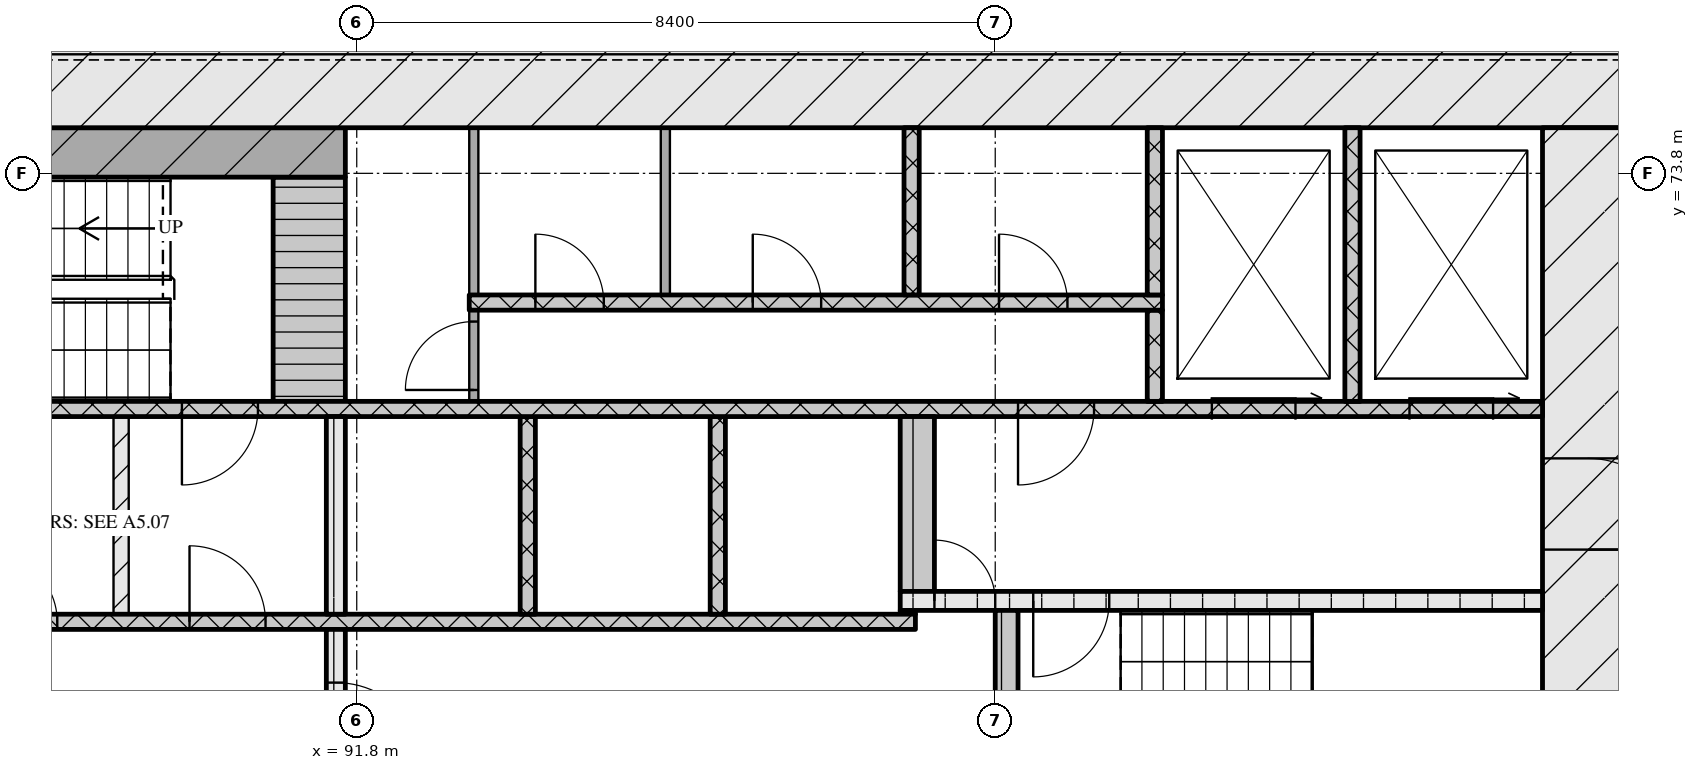
"""IFC4 building model, lengths in metres.
Left out: names, types, materials, properties, quantities, classifications, styles, units other than length and angle.
Written with IfcOpenShell. Run it as: python <this file> out.ifc"""

import sys

from ifc_helpers import new_model, si_unit, direction, frame, frame_2d, origin, place, context, subcontext, project, spatial, rectangle, extrude, element, fill, save


model = new_model("IFC4")
c1 = context("Model", 3, precision=1e-05, world=origin(), true_north=direction((0.0, 1.0)))
c2 = subcontext(c1, "Body", "Model", "MODEL_VIEW")
j1 = project(units=[si_unit("LENGTHUNIT", "METRE"), si_unit("PLANEANGLEUNIT", "RADIAN")], contexts=[c1])
p1 = place(None, origin())
s1 = spatial("IfcSite", under=j1, at=p1, CompositionType="ELEMENT")
p2 = place(p1, origin())
s2 = spatial("IfcBuilding", under=s1, at=p2, CompositionType="ELEMENT")
p3 = place(p2, frame((0.0, 0.0, 37.2)))
s3 = spatial("IfcBuildingStorey", under=s2, at=p3, CompositionType="ELEMENT", Elevation=37.2)
p4 = place(p3, frame((66.6, 75.0, 0.0), z_axis=(0.0, 0.0, 1.0), x_axis=(1.0, 0.0, 0.0)))
e1 = element("IfcWall", 1, at=p4, inside=s3, PredefinedType="SOLIDWALL", context=c2, shape_type="SweptSolid", body=[
    extrude(rectangle(XDim=42.0, YDim=1.2, at=frame_2d((21.0, 0.0))), origin(), (0.0, 0.0, 1.0), 3.32),
])
p5 = place(p3, frame((108.0, 62.4, 0.0), z_axis=(0.0, 0.0, 1.0), x_axis=(0.0, 1.0, 0.0)))
e2 = element("IfcWall", 2, at=p5, inside=s3, PredefinedType="SOLIDWALL", context=c2, shape_type="SweptSolid", body=[
    extrude(rectangle(XDim=12.0, YDim=1.2, at=frame_2d((6.0, 0.0))), origin(), (0.0, 0.0, 1.0), 3.32),
])
p6 = place(p5, frame((6.45, 0.0, 0.0)))
e3 = element("IfcOpeningElement", 3, at=p6, cuts=e2, PredefinedType="OPENING", context=c2, shape_type="SweptSolid", body=[
    extrude(rectangle(XDim=1.2, YDim=2.1, at=frame_2d((0.6, 1.05))), frame((0.0, 0.61, 0.0), z_axis=(0.0, -1.0, 0.0), x_axis=(1.0, 0.0, 0.0)), (0.0, 0.0, 1.0), 1.22),
])
p7 = place(p3, frame((91.525, 65.2, 0.0), z_axis=(0.0, 0.0, 1.0), x_axis=(0.0, 1.0, 0.0)))
e4 = element("IfcWall", 4, at=p7, inside=s3, PredefinedType="SOLIDWALL", context=c2, shape_type="SweptSolid", body=[
    extrude(rectangle(XDim=2.6, YDim=0.25, at=frame_2d((1.3, 0.0))), origin(), (0.0, 0.0, 1.0), 3.32),
])
p8 = place(p7, frame((0.7, 0.0, 0.0)))
e5 = element("IfcOpeningElement", 5, at=p8, cuts=e4, PredefinedType="OPENING", context=c2, shape_type="SweptSolid", body=[
    extrude(rectangle(XDim=1.2, YDim=2.1, at=frame_2d((0.6, 1.05))), frame((0.0, 0.135, 0.0), z_axis=(0.0, -1.0, 0.0), x_axis=(1.0, 0.0, 0.0)), (0.0, 0.0, 1.0), 0.27),
])
p9 = place(p3, frame((100.35, 65.2, 0.0), z_axis=(0.0, 0.0, 1.0), x_axis=(0.0, 1.0, 0.0)))
e6 = element("IfcWall", 6, at=p9, inside=s3, PredefinedType="SOLIDWALL", context=c2, shape_type="SweptSolid", body=[
    extrude(rectangle(XDim=2.85, YDim=0.3, at=frame_2d((1.425, 0.0))), origin(), (0.0, 0.0, 1.0), 3.32),
])
p10 = place(p3, frame((76.05, 67.9, 0.0), z_axis=(0.0, 0.0, 1.0), x_axis=(1.0, 0.0, 0.0)))
e7 = element("IfcWall", 7, at=p10, inside=s3, PredefinedType="SOLIDWALL", context=c2, shape_type="SweptSolid", body=[
    extrude(rectangle(XDim=23.1, YDim=0.2, at=frame_2d((11.55, 0.0))), origin(), (0.0, 0.0, 1.0), 3.32),
])
p11 = place(p10, frame((0.6, 0.0, 0.0)))
e8 = element("IfcOpeningElement", 8, at=p11, cuts=e7, PredefinedType="OPENING", context=c2, shape_type="SweptSolid", body=[
    extrude(rectangle(XDim=1.1, YDim=2.1, at=frame_2d((0.55, 1.05))), frame((0.0, 0.11, 0.0), z_axis=(0.0, -1.0, 0.0), x_axis=(1.0, 0.0, 0.0)), (0.0, 0.0, 1.0), 0.22),
])
p12 = place(p10, frame((3.1, 0.0, 0.0)))
e9 = element("IfcOpeningElement", 9, at=p12, cuts=e7, PredefinedType="OPENING", context=c2, shape_type="SweptSolid", body=[
    extrude(rectangle(XDim=1.1, YDim=2.1, at=frame_2d((0.55, 1.05))), frame((0.0, 0.11, 0.0), z_axis=(0.0, -1.0, 0.0), x_axis=(1.0, 0.0, 0.0)), (0.0, 0.0, 1.0), 0.22),
])
p13 = place(p10, frame((5.6, 0.0, 0.0)))
e10 = element("IfcOpeningElement", 10, at=p13, cuts=e7, PredefinedType="OPENING", context=c2, shape_type="SweptSolid", body=[
    extrude(rectangle(XDim=1.1, YDim=2.1, at=frame_2d((0.55, 1.05))), frame((0.0, 0.11, 0.0), z_axis=(0.0, -1.0, 0.0), x_axis=(1.0, 0.0, 0.0)), (0.0, 0.0, 1.0), 0.22),
])
p14 = place(p10, frame((8.45, 0.0, 0.0)))
e11 = element("IfcOpeningElement", 11, at=p14, cuts=e7, PredefinedType="OPENING", context=c2, shape_type="SweptSolid", body=[
    extrude(rectangle(XDim=0.9, YDim=2.1, at=frame_2d((0.45, 1.05))), frame((0.0, 0.11, 0.0), z_axis=(0.0, -1.0, 0.0), x_axis=(1.0, 0.0, 0.0)), (0.0, 0.0, 1.0), 0.22),
])
p15 = place(p10, frame((10.91, 0.0, 0.0)))
e12 = element("IfcOpeningElement", 12, at=p15, cuts=e7, PredefinedType="OPENING", context=c2, shape_type="SweptSolid", body=[
    extrude(rectangle(XDim=0.9, YDim=2.1, at=frame_2d((0.45, 1.05))), frame((0.0, 0.11, 0.0), z_axis=(0.0, -1.0, 0.0), x_axis=(1.0, 0.0, 0.0)), (0.0, 0.0, 1.0), 0.22),
])
p16 = place(p10, frame((13.55, 0.0, 0.0)))
e13 = element("IfcOpeningElement", 13, at=p16, cuts=e7, PredefinedType="OPENING", context=c2, shape_type="SweptSolid", body=[
    extrude(rectangle(XDim=1.0, YDim=2.1, at=frame_2d((0.5, 1.05))), frame((0.0, 0.11, 0.0), z_axis=(0.0, -1.0, 0.0), x_axis=(1.0, 0.0, 0.0)), (0.0, 0.0, 1.0), 0.22),
])
p17 = place(p3, frame((88.7, 68.0, 0.0), z_axis=(0.0, 0.0, 1.0), x_axis=(0.0, 1.0, 0.0)))
e14 = element("IfcWall", 14, at=p17, inside=s3, PredefinedType="PARTITIONING", context=c2, shape_type="SweptSolid", body=[
    extrude(rectangle(XDim=2.6, YDim=0.2, at=frame_2d((1.3, 0.0))), origin(), (0.0, 0.0, 1.0), 3.32),
])
p18 = place(p3, frame((91.525, 68.0, 0.0), z_axis=(0.0, 0.0, 1.0), x_axis=(0.0, 1.0, 0.0)))
e15 = element("IfcWall", 15, at=p18, inside=s3, PredefinedType="SOLIDWALL", context=c2, shape_type="SweptSolid", body=[
    extrude(rectangle(XDim=2.6, YDim=0.25, at=frame_2d((1.3, 0.0))), origin(), (0.0, 0.0, 1.0), 3.32),
])
for number, where, z_axis, x_axis in (
    (16, (94.05, 68.0, 0.0), (0.0, 0.0, 1.0), (0.0, 1.0, 0.0)),
    (17, (96.55, 68.0, 0.0), (0.0, 0.0, 1.0), (0.0, 1.0, 0.0)),
):
    element("IfcWall", number, at=place(p3, frame(where, z_axis=z_axis, x_axis=x_axis)), inside=s3, PredefinedType="SOLIDWALL", context=c2, shape_type="SweptSolid", body=[
        extrude(rectangle(XDim=2.6, YDim=0.2, at=frame_2d((1.3, 0.0))), origin(), (0.0, 0.0, 1.0), 3.32),
    ])
p19 = place(p3, frame((98.95, 68.025, 0.0), z_axis=(0.0, 0.0, 1.0), x_axis=(1.0, 0.0, 0.0)))
e18 = element("IfcWall", 18, at=p19, inside=s3, PredefinedType="SOLIDWALL", context=c2, shape_type="SweptSolid", body=[
    extrude(rectangle(XDim=0.2, YDim=0.05, at=frame_2d((0.1, 0.0))), origin(), (0.0, 0.0, 1.0), 3.32),
])
p20 = place(p3, frame((98.95, 68.175, 0.0), z_axis=(0.0, 0.0, 1.0), x_axis=(1.0, 0.0, 0.0)))
e19 = element("IfcWall", 19, at=p20, inside=s3, PredefinedType="SOLIDWALL", context=c2, shape_type="SweptSolid", body=[
    extrude(rectangle(XDim=8.45, YDim=0.25, at=frame_2d((4.225, 0.0))), origin(), (0.0, 0.0, 1.0), 3.32),
])
p21 = place(p20, frame((0.45, 0.0, 0.0)))
e20 = element("IfcOpeningElement", 20, at=p21, cuts=e19, PredefinedType="OPENING", context=c2, shape_type="SweptSolid", body=[
    extrude(rectangle(XDim=0.8, YDim=2.1, at=frame_2d((0.4, 1.05))), frame((0.0, 0.135, 0.0), z_axis=(0.0, -1.0, 0.0), x_axis=(1.0, 0.0, 0.0)), (0.0, 0.0, 1.0), 0.27),
])
p22 = place(p20, frame((1.75, 0.0, 0.0)))
e21 = element("IfcOpeningElement", 21, at=p22, cuts=e19, PredefinedType="OPENING", context=c2, shape_type="SweptSolid", body=[
    extrude(rectangle(XDim=1.0, YDim=2.1, at=frame_2d((0.5, 1.05))), frame((0.0, 0.135, 0.0), z_axis=(0.0, -1.0, 0.0), x_axis=(1.0, 0.0, 0.0)), (0.0, 0.0, 1.0), 0.27),
])
p23 = place(p3, frame((99.175, 68.3, 0.0), z_axis=(0.0, 0.0, 1.0), x_axis=(0.0, 1.0, 0.0)))
e22 = element("IfcWall", 22, at=p23, inside=s3, PredefinedType="SOLIDWALL", context=c2, shape_type="SweptSolid", body=[
    extrude(rectangle(XDim=2.3, YDim=0.45, at=frame_2d((1.15, 0.0))), origin(), (0.0, 0.0, 1.0), 3.32),
])
p24 = place(p3, frame((67.8, 70.7, 0.0), z_axis=(0.0, 0.0, 1.0), x_axis=(1.0, 0.0, 0.0)))
e23 = element("IfcWall", 23, at=p24, inside=s3, PredefinedType="SOLIDWALL", context=c2, shape_type="SweptSolid", body=[
    extrude(rectangle(XDim=39.6, YDim=0.2, at=frame_2d((19.8, 0.0))), origin(), (0.0, 0.0, 1.0), 3.32),
])
p25 = place(p24, frame((0.65, 0.0, 0.0)))
e24 = element("IfcOpeningElement", 24, at=p25, cuts=e23, PredefinedType="OPENING", context=c2, shape_type="SweptSolid", body=[
    extrude(rectangle(XDim=1.1, YDim=2.1, at=frame_2d((0.55, 1.05))), frame((0.0, 0.11, 0.0), z_axis=(0.0, -1.0, 0.0), x_axis=(1.0, 0.0, 0.0)), (0.0, 0.0, 1.0), 0.22),
])
p26 = place(p24, frame((3.25, 0.0, 0.0)))
e25 = element("IfcOpeningElement", 25, at=p26, cuts=e23, PredefinedType="OPENING", context=c2, shape_type="SweptSolid", body=[
    extrude(rectangle(XDim=1.1, YDim=2.1, at=frame_2d((0.55, 1.05))), frame((0.0, 0.11, 0.0), z_axis=(0.0, -1.0, 0.0), x_axis=(1.0, 0.0, 0.0)), (0.0, 0.0, 1.0), 0.22),
])
p27 = place(p24, frame((5.9, 0.0, 0.0)))
e26 = element("IfcOpeningElement", 26, at=p27, cuts=e23, PredefinedType="OPENING", context=c2, shape_type="SweptSolid", body=[
    extrude(rectangle(XDim=1.0, YDim=2.1, at=frame_2d((0.5, 1.05))), frame((0.0, 0.11, 0.0), z_axis=(0.0, -1.0, 0.0), x_axis=(1.0, 0.0, 0.0)), (0.0, 0.0, 1.0), 0.22),
])
p28 = place(p24, frame((21.7, 0.0, 0.0)))
e27 = element("IfcOpeningElement", 27, at=p28, cuts=e23, PredefinedType="OPENING", context=c2, shape_type="SweptSolid", body=[
    extrude(rectangle(XDim=1.0, YDim=2.1, at=frame_2d((0.5, 1.05))), frame((0.0, 0.11, 0.0), z_axis=(0.0, -1.0, 0.0), x_axis=(1.0, 0.0, 0.0)), (0.0, 0.0, 1.0), 0.22),
])
p29 = place(p24, frame((32.7, 0.0, 0.0)))
e28 = element("IfcOpeningElement", 28, at=p29, cuts=e23, PredefinedType="OPENING", context=c2, shape_type="SweptSolid", body=[
    extrude(rectangle(XDim=1.0, YDim=2.1, at=frame_2d((0.5, 1.05))), frame((0.0, 0.11, 0.0), z_axis=(0.0, -1.0, 0.0), x_axis=(1.0, 0.0, 0.0)), (0.0, 0.0, 1.0), 0.22),
])
p30 = place(p24, frame((35.25, 0.0, 0.0)))
e29 = element("IfcOpeningElement", 29, at=p30, cuts=e23, PredefinedType="OPENING", context=c2, shape_type="SweptSolid", body=[
    extrude(rectangle(XDim=1.1, YDim=2.1, at=frame_2d((0.55, 1.05))), frame((0.0, 0.11, 0.0), z_axis=(0.0, -1.0, 0.0), x_axis=(1.0, 0.0, 0.0)), (0.0, 0.0, 1.0), 0.22),
])
p31 = place(p24, frame((37.85, 0.0, 0.0)))
e30 = element("IfcOpeningElement", 30, at=p31, cuts=e23, PredefinedType="OPENING", context=c2, shape_type="SweptSolid", body=[
    extrude(rectangle(XDim=1.1, YDim=2.1, at=frame_2d((0.55, 1.05))), frame((0.0, 0.11, 0.0), z_axis=(0.0, -1.0, 0.0), x_axis=(1.0, 0.0, 0.0)), (0.0, 0.0, 1.0), 0.22),
])
p32 = place(p3, frame((91.175, 70.8, 0.0), z_axis=(0.0, 0.0, 1.0), x_axis=(0.0, 1.0, 0.0)))
e31 = element("IfcWall", 31, at=p32, inside=s3, PredefinedType="SOLIDWALL", context=c2, shape_type="SweptSolid", body=[
    extrude(rectangle(XDim=2.95, YDim=0.95, at=frame_2d((1.475, 0.0))), origin(), (0.0, 0.0, 1.0), 3.32),
])
p33 = place(p3, frame((93.34, 70.8, 0.0), z_axis=(0.0, 0.0, 1.0), x_axis=(0.0, 1.0, 0.0)))
e32 = element("IfcWall", 32, at=p33, inside=s3, PredefinedType="PARTITIONING", context=c2, shape_type="SweptSolid", body=[
    extrude(rectangle(XDim=1.2, YDim=0.12, at=frame_2d((0.6, 0.0))), origin(), (0.0, 0.0, 1.0), 3.32),
])
p34 = place(p33, frame((0.15, 0.0, 0.0)))
e33 = element("IfcOpeningElement", 33, at=p34, cuts=e32, PredefinedType="OPENING", context=c2, shape_type="SweptSolid", body=[
    extrude(rectangle(XDim=0.9, YDim=2.1, at=frame_2d((0.45, 1.05))), frame((0.0, 0.07, 0.0), z_axis=(0.0, -1.0, 0.0), x_axis=(1.0, 0.0, 0.0)), (0.0, 0.0, 1.0), 0.14),
])
p35 = place(p3, frame((102.3, 70.8, 0.0), z_axis=(0.0, 0.0, 1.0), x_axis=(0.0, 1.0, 0.0)))
e34 = element("IfcWall", 34, at=p35, inside=s3, PredefinedType="SOLIDWALL", context=c2, shape_type="SweptSolid", body=[
    extrude(rectangle(XDim=1.2, YDim=0.2, at=frame_2d((0.6, 0.0))), origin(), (0.0, 0.0, 1.0), 3.32),
])
p36 = place(p3, frame((104.9, 70.8, 0.0), z_axis=(0.0, 0.0, 1.0), x_axis=(0.0, 1.0, 0.0)))
e35 = element("IfcWall", 35, at=p36, inside=s3, PredefinedType="SOLIDWALL", context=c2, shape_type="SweptSolid", body=[
    extrude(rectangle(XDim=3.6, YDim=0.2, at=frame_2d((1.8, 0.0))), origin(), (0.0, 0.0, 1.0), 3.32),
])
p37 = place(p3, frame((93.28, 72.1, 0.0), z_axis=(0.0, 0.0, 1.0), x_axis=(1.0, 0.0, 0.0)))
e36 = element("IfcWall", 36, at=p37, inside=s3, PredefinedType="SOLIDWALL", context=c2, shape_type="SweptSolid", body=[
    extrude(rectangle(XDim=9.12, YDim=0.2, at=frame_2d((4.56, 0.0))), origin(), (0.0, 0.0, 1.0), 3.32),
])
p38 = place(p37, frame((0.87, 0.0, 0.0)))
e37 = element("IfcOpeningElement", 37, at=p38, cuts=e36, PredefinedType="OPENING", context=c2, shape_type="SweptSolid", body=[
    extrude(rectangle(XDim=0.9, YDim=2.1, at=frame_2d((0.45, 1.05))), frame((0.0, 0.11, 0.0), z_axis=(0.0, -1.0, 0.0), x_axis=(1.0, 0.0, 0.0)), (0.0, 0.0, 1.0), 0.22),
])
p39 = place(p37, frame((3.73, 0.0, 0.0)))
e38 = element("IfcOpeningElement", 38, at=p39, cuts=e36, PredefinedType="OPENING", context=c2, shape_type="SweptSolid", body=[
    extrude(rectangle(XDim=0.9, YDim=2.1, at=frame_2d((0.45, 1.05))), frame((0.0, 0.11, 0.0), z_axis=(0.0, -1.0, 0.0), x_axis=(1.0, 0.0, 0.0)), (0.0, 0.0, 1.0), 0.22),
])
p40 = place(p37, frame((6.97, 0.0, 0.0)))
e39 = element("IfcOpeningElement", 39, at=p40, cuts=e36, PredefinedType="OPENING", context=c2, shape_type="SweptSolid", body=[
    extrude(rectangle(XDim=0.9, YDim=2.1, at=frame_2d((0.45, 1.05))), frame((0.0, 0.11, 0.0), z_axis=(0.0, -1.0, 0.0), x_axis=(1.0, 0.0, 0.0)), (0.0, 0.0, 1.0), 0.22),
])
for number, where, z_axis, x_axis in (
    (40, (93.34, 72.2, 0.0), (0.0, 0.0, 1.0), (0.0, 1.0, 0.0)),
    (41, (95.86, 72.2, 0.0), (0.0, 0.0, 1.0), (0.0, 1.0, 0.0)),
):
    element("IfcWall", number, at=place(p3, frame(where, z_axis=z_axis, x_axis=x_axis)), inside=s3, PredefinedType="PARTITIONING", context=c2, shape_type="SweptSolid", body=[
        extrude(rectangle(XDim=2.2, YDim=0.12, at=frame_2d((1.1, 0.0))), origin(), (0.0, 0.0, 1.0), 3.32),
    ])
for number, where, z_axis, x_axis in (
    (42, (99.1, 72.2, 0.0), (0.0, 0.0, 1.0), (0.0, 1.0, 0.0)),
    (43, (102.3, 72.2, 0.0), (0.0, 0.0, 1.0), (0.0, 1.0, 0.0)),
):
    element("IfcWall", number, at=place(p3, frame(where, z_axis=z_axis, x_axis=x_axis)), inside=s3, PredefinedType="SOLIDWALL", context=c2, shape_type="SweptSolid", body=[
        extrude(rectangle(XDim=2.2, YDim=0.2, at=frame_2d((1.1, 0.0))), origin(), (0.0, 0.0, 1.0), 3.32),
    ])
p41 = place(p3, frame((83.55, 74.075, 0.0), z_axis=(0.0, 0.0, 1.0), x_axis=(1.0, 0.0, 0.0)))
e44 = element("IfcWall", 44, at=p41, inside=s3, PredefinedType="SOLIDWALL", context=c2, shape_type="SweptSolid", body=[
    extrude(rectangle(XDim=8.1, YDim=0.65, at=frame_2d((4.05, 0.0))), origin(), (0.0, 0.0, 1.0), 3.32),
])
p42 = place(p8, origin())
e45 = element("IfcDoor", 45, at=p42, inside=s3, OperationType="SINGLE_SWING_RIGHT", PredefinedType="DOOR", context=c2, shape_type="SweptSolid", body=[
    extrude(rectangle(XDim=1.2, YDim=2.1, at=frame_2d((0.6, 1.05))), frame((0.0, 0.025, 0.0), z_axis=(0.0, -1.0, 0.0), x_axis=(1.0, 0.0, 0.0)), (0.0, 0.0, 1.0), 0.05),
])
fill(e5, e45)
p43 = place(p15, origin())
e46 = element("IfcDoor", 46, at=p43, inside=s3, OperationType="SINGLE_SWING_LEFT", PredefinedType="DOOR", context=c2, shape_type="SweptSolid", body=[
    extrude(rectangle(XDim=0.9, YDim=2.1, at=frame_2d((0.45, 1.05))), frame((0.0, 0.025, 0.0), z_axis=(0.0, -1.0, 0.0), x_axis=(1.0, 0.0, 0.0)), (0.0, 0.0, 1.0), 0.05),
])
fill(e12, e46)
p44 = place(p16, origin())
e47 = element("IfcDoor", 47, at=p44, inside=s3, OperationType="SINGLE_SWING_LEFT", PredefinedType="DOOR", context=c2, shape_type="SweptSolid", body=[
    extrude(rectangle(XDim=1.0, YDim=2.1, at=frame_2d((0.5, 1.05))), frame((0.0, 0.025, 0.0), z_axis=(0.0, -1.0, 0.0), x_axis=(1.0, 0.0, 0.0)), (0.0, 0.0, 1.0), 0.05),
])
fill(e13, e47)
p45 = place(p21, origin())
e48 = element("IfcDoor", 48, at=p45, inside=s3, OperationType="SINGLE_SWING_LEFT", PredefinedType="DOOR", context=c2, shape_type="SweptSolid", body=[
    extrude(rectangle(XDim=0.8, YDim=2.1, at=frame_2d((0.4, 1.05))), frame((0.0, 0.025, 0.0), z_axis=(0.0, -1.0, 0.0), x_axis=(1.0, 0.0, 0.0)), (0.0, 0.0, 1.0), 0.05),
])
fill(e20, e48)
p46 = place(p22, origin())
e49 = element("IfcDoor", 49, at=p46, inside=s3, OperationType="SINGLE_SWING_RIGHT", PredefinedType="DOOR", context=c2, shape_type="SweptSolid", body=[
    extrude(rectangle(XDim=1.0, YDim=2.1, at=frame_2d((0.5, 1.05))), frame((0.0, 0.025, 0.0), z_axis=(0.0, -1.0, 0.0), x_axis=(1.0, 0.0, 0.0)), (0.0, 0.0, 1.0), 0.05),
])
fill(e21, e49)
p47 = place(p6, origin())
e50 = element("IfcDoor", 50, at=p47, inside=s3, OperationType="SINGLE_SWING_RIGHT", PredefinedType="DOOR", context=c2, shape_type="SweptSolid", body=[
    extrude(rectangle(XDim=1.2, YDim=2.1, at=frame_2d((0.6, 1.05))), frame((0.0, 0.025, 0.0), z_axis=(0.0, -1.0, 0.0), x_axis=(1.0, 0.0, 0.0)), (0.0, 0.0, 1.0), 0.05),
])
fill(e3, e50)
p48 = place(p28, origin())
e51 = element("IfcDoor", 51, at=p48, inside=s3, OperationType="SINGLE_SWING_RIGHT", PredefinedType="DOOR", context=c2, shape_type="SweptSolid", body=[
    extrude(rectangle(XDim=1.0, YDim=2.1, at=frame_2d((0.5, 1.05))), frame((0.0, 0.025, 0.0), z_axis=(0.0, -1.0, 0.0), x_axis=(1.0, 0.0, 0.0)), (0.0, 0.0, 1.0), 0.05),
])
fill(e27, e51)
p49 = place(p29, origin())
e52 = element("IfcDoor", 52, at=p49, inside=s3, OperationType="SINGLE_SWING_RIGHT", PredefinedType="DOOR", context=c2, shape_type="SweptSolid", body=[
    extrude(rectangle(XDim=1.0, YDim=2.1, at=frame_2d((0.5, 1.05))), frame((0.0, 0.025, 0.0), z_axis=(0.0, -1.0, 0.0), x_axis=(1.0, 0.0, 0.0)), (0.0, 0.0, 1.0), 0.05),
])
fill(e28, e52)
p50 = place(p30, origin())
e53 = element("IfcDoor", 53, at=p50, inside=s3, OperationType="SLIDING_TO_RIGHT", PredefinedType="DOOR", context=c2, shape_type="SweptSolid", body=[
    extrude(rectangle(XDim=1.1, YDim=2.1, at=frame_2d((0.55, 1.05))), frame((0.0, 0.025, 0.0), z_axis=(0.0, -1.0, 0.0), x_axis=(1.0, 0.0, 0.0)), (0.0, 0.0, 1.0), 0.05),
])
fill(e29, e53)
p51 = place(p31, origin())
e54 = element("IfcDoor", 54, at=p51, inside=s3, OperationType="SLIDING_TO_RIGHT", PredefinedType="DOOR", context=c2, shape_type="SweptSolid", body=[
    extrude(rectangle(XDim=1.1, YDim=2.1, at=frame_2d((0.55, 1.05))), frame((0.0, 0.025, 0.0), z_axis=(0.0, -1.0, 0.0), x_axis=(1.0, 0.0, 0.0)), (0.0, 0.0, 1.0), 0.05),
])
fill(e30, e54)
p52 = place(p34, origin())
e55 = element("IfcDoor", 55, at=p52, inside=s3, OperationType="SINGLE_SWING_LEFT", PredefinedType="DOOR", context=c2, shape_type="SweptSolid", body=[
    extrude(rectangle(XDim=0.9, YDim=2.1, at=frame_2d((0.45, 1.05))), frame((0.0, 0.025, 0.0), z_axis=(0.0, -1.0, 0.0), x_axis=(1.0, 0.0, 0.0)), (0.0, 0.0, 1.0), 0.05),
])
fill(e33, e55)
p53 = place(p38, origin())
e56 = element("IfcDoor", 56, at=p53, inside=s3, OperationType="SINGLE_SWING_LEFT", PredefinedType="DOOR", context=c2, shape_type="SweptSolid", body=[
    extrude(rectangle(XDim=0.9, YDim=2.1, at=frame_2d((0.45, 1.05))), frame((0.0, 0.025, 0.0), z_axis=(0.0, -1.0, 0.0), x_axis=(1.0, 0.0, 0.0)), (0.0, 0.0, 1.0), 0.05),
])
fill(e37, e56)
p54 = place(p39, origin())
e57 = element("IfcDoor", 57, at=p54, inside=s3, OperationType="SINGLE_SWING_LEFT", PredefinedType="DOOR", context=c2, shape_type="SweptSolid", body=[
    extrude(rectangle(XDim=0.9, YDim=2.1, at=frame_2d((0.45, 1.05))), frame((0.0, 0.025, 0.0), z_axis=(0.0, -1.0, 0.0), x_axis=(1.0, 0.0, 0.0)), (0.0, 0.0, 1.0), 0.05),
])
fill(e38, e57)
p55 = place(p40, origin())
e58 = element("IfcDoor", 58, at=p55, inside=s3, OperationType="SINGLE_SWING_LEFT", PredefinedType="DOOR", context=c2, shape_type="SweptSolid", body=[
    extrude(rectangle(XDim=0.9, YDim=2.1, at=frame_2d((0.45, 1.05))), frame((0.0, 0.025, 0.0), z_axis=(0.0, -1.0, 0.0), x_axis=(1.0, 0.0, 0.0)), (0.0, 0.0, 1.0), 0.05),
])
fill(e39, e58)
save(model, sys.argv[1])
